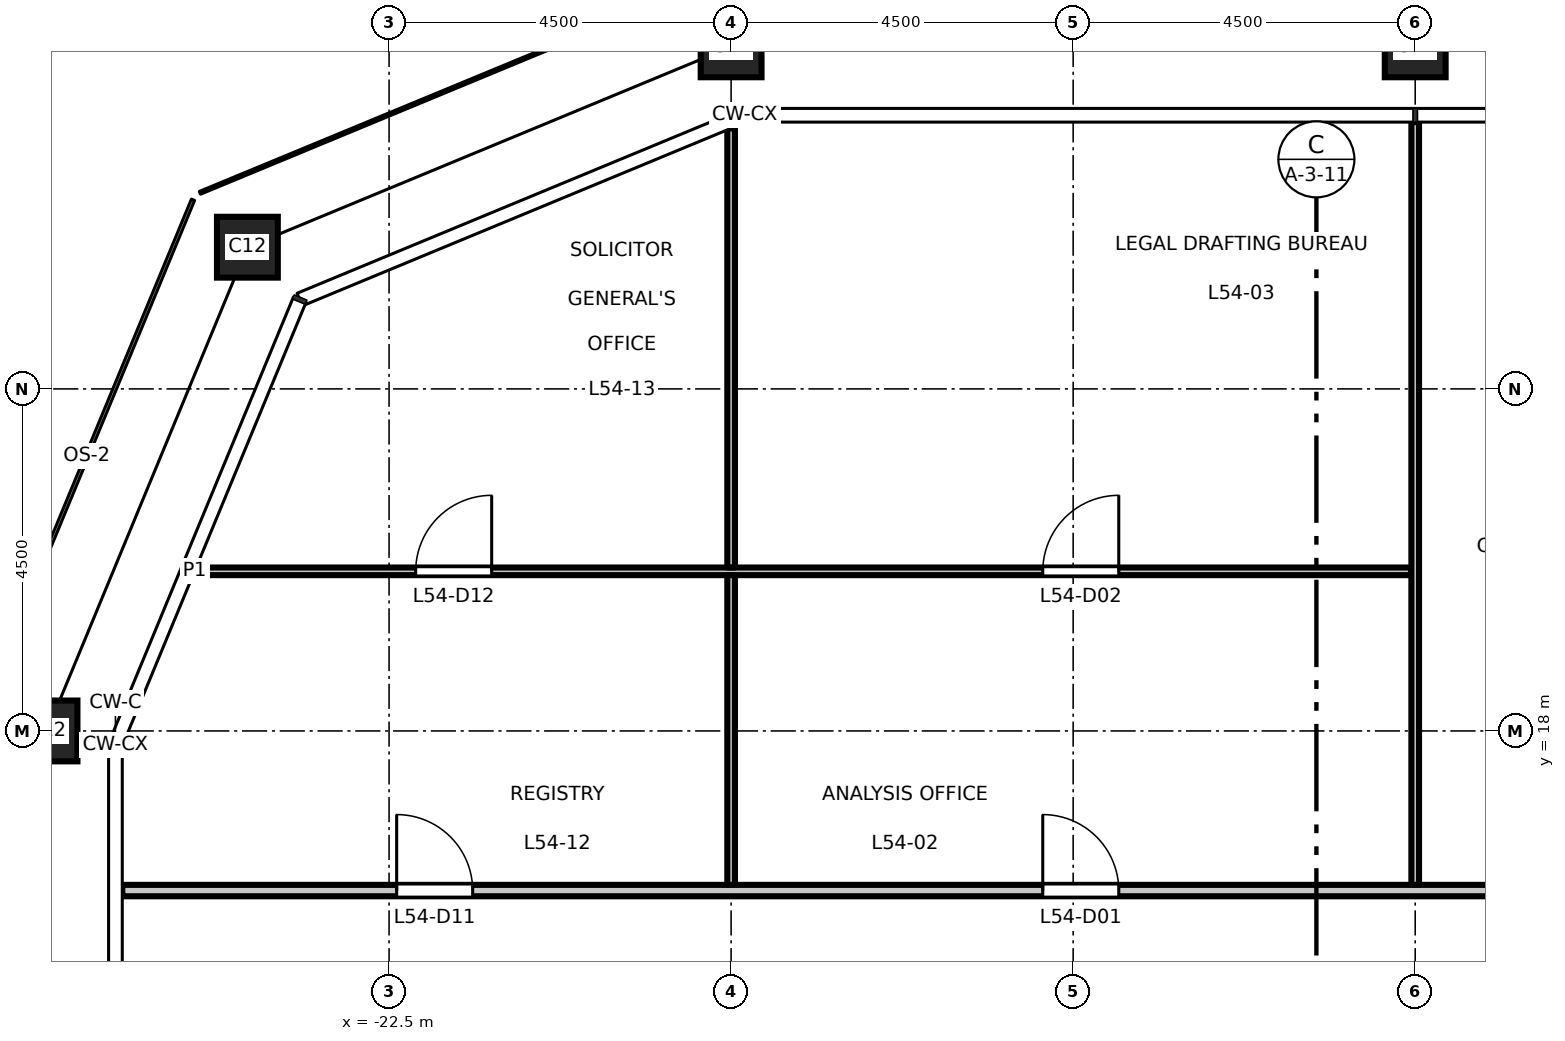
"""IFC4 building model, lengths in metres.
Left out: names, types, materials, properties, quantities, classifications, styles, units other than length and angle.
Written with IfcOpenShell. Run it as: python <this file> out.ifc"""

import sys

from ifc_helpers import new_model, si_unit, direction, frame, frame_2d, origin, origin_2d, place, context, subcontext, project, spatial, rectangle, hollow_rectangle, extrude, element, fill, save


model = new_model("IFC4")
c1 = context("Model", 3, precision=1e-05, world=origin(), true_north=direction((0.0, 1.0)))
c2 = subcontext(c1, "Body", "Model", "MODEL_VIEW")
j1 = project(units=[si_unit("LENGTHUNIT", "METRE"), si_unit("PLANEANGLEUNIT", "RADIAN")], contexts=[c1])
p1 = place(None, origin())
s1 = spatial("IfcSite", under=j1, at=p1, CompositionType="ELEMENT")
p2 = place(p1, origin())
s2 = spatial("IfcBuilding", under=s1, at=p2, CompositionType="ELEMENT")
p3 = place(p2, frame((0.0, 0.0, 251.2)))
s3 = spatial("IfcBuildingStorey", under=s2, at=p3, CompositionType="ELEMENT", Elevation=251.2)
for number, where, z_axis, x_axis in (
    (1, (-9.0, 27.0, 0.0), (0.0, 0.0, 1.0), (1.0, 0.0, 0.0)),
    (2, (-18.0, 27.0, 0.0), (0.0, 0.0, 1.0), (1.0, 0.0, 0.0)),
    (3, (-24.364, 24.364, 0.0), (0.0, 0.0, 1.0), (1.0, 0.0, 0.0)),
    (4, (-27.0, 18.0, 0.0), (0.0, 0.0, 1.0), (1.0, 0.0, 0.0)),
):
    element("IfcColumn", number, at=place(p3, frame(where, z_axis=z_axis, x_axis=x_axis)), inside=s3, PredefinedType="COLUMN", context=c2, shape_type="SweptSolid", body=[
        extrude(hollow_rectangle(XDim=0.8, YDim=0.8, WallThickness=0.045, at=origin_2d()), origin(), (0.0, 0.0, 1.0), 4.5),
    ])
p4 = place(p3, frame((-26.01, 15.9, 0.0), z_axis=(0.0, 0.0, 1.0), x_axis=(1.0, 0.0, 0.0)))
e5 = element("IfcWall", 5, at=p4, inside=s3, PredefinedType="PARTITIONING", context=c2, shape_type="SweptSolid", body=[
    extrude(rectangle(XDim=52.02, YDim=0.15, at=frame_2d((26.01, 0.0))), origin(), (0.0, 0.0, 1.0), 4.35),
])
p5 = place(p4, frame((12.11, 0.0, 0.0)))
e6 = element("IfcOpeningElement", 6, at=p5, cuts=e5, PredefinedType="OPENING", context=c2, shape_type="SweptSolid", body=[
    extrude(rectangle(XDim=1.0, YDim=2.1, at=frame_2d((0.5, 1.05))), frame((0.0, 0.085, 0.0), z_axis=(0.0, -1.0, 0.0), x_axis=(1.0, 0.0, 0.0)), (0.0, 0.0, 1.0), 0.17),
])
p6 = place(p4, frame((21.11, 0.0, 0.0)))
e7 = element("IfcOpeningElement", 7, at=p6, cuts=e5, PredefinedType="OPENING", context=c2, shape_type="SweptSolid", body=[
    extrude(rectangle(XDim=1.0, YDim=2.1, at=frame_2d((0.5, 1.05))), frame((0.0, 0.085, 0.0), z_axis=(0.0, -1.0, 0.0), x_axis=(1.0, 0.0, 0.0)), (0.0, 0.0, 1.0), 0.17),
])
p7 = place(p4, frame((30.11, 0.0, 0.0)))
e8 = element("IfcOpeningElement", 8, at=p7, cuts=e5, PredefinedType="OPENING", context=c2, shape_type="SweptSolid", body=[
    extrude(rectangle(XDim=1.0, YDim=2.1, at=frame_2d((0.5, 1.05))), frame((0.0, 0.085, 0.0), z_axis=(0.0, -1.0, 0.0), x_axis=(1.0, 0.0, 0.0)), (0.0, 0.0, 1.0), 0.17),
])
p8 = place(p4, frame((39.11, 0.0, 0.0)))
e9 = element("IfcOpeningElement", 9, at=p8, cuts=e5, PredefinedType="OPENING", context=c2, shape_type="SweptSolid", body=[
    extrude(rectangle(XDim=1.0, YDim=2.1, at=frame_2d((0.5, 1.05))), frame((0.0, 0.085, 0.0), z_axis=(0.0, -1.0, 0.0), x_axis=(1.0, 0.0, 0.0)), (0.0, 0.0, 1.0), 0.17),
])
p9 = place(p4, frame((3.61, 0.0, 0.0)))
e10 = element("IfcOpeningElement", 10, at=p9, cuts=e5, PredefinedType="OPENING", context=c2, shape_type="SweptSolid", body=[
    extrude(rectangle(XDim=1.0, YDim=2.1, at=frame_2d((0.5, 1.05))), frame((0.0, 0.085, 0.0), z_axis=(0.0, -1.0, 0.0), x_axis=(1.0, 0.0, 0.0)), (0.0, 0.0, 1.0), 0.17),
])
p10 = place(p4, frame((47.62, 0.0, 0.0)))
e11 = element("IfcOpeningElement", 11, at=p10, cuts=e5, PredefinedType="OPENING", context=c2, shape_type="SweptSolid", body=[
    extrude(rectangle(XDim=1.0, YDim=2.1, at=frame_2d((0.5, 1.05))), frame((0.0, 0.085, 0.0), z_axis=(0.0, -1.0, 0.0), x_axis=(1.0, 0.0, 0.0)), (0.0, 0.0, 1.0), 0.17),
])
p11 = place(p3, frame((-25.058, 20.1, 0.0), z_axis=(0.0, 0.0, 1.0), x_axis=(1.0, 0.0, 0.0)))
e12 = element("IfcWall", 12, at=p11, inside=s3, PredefinedType="PARTITIONING", context=c2, shape_type="SweptSolid", body=[
    extrude(rectangle(XDim=16.008, YDim=0.1, at=frame_2d((8.004, 0.0))), origin(), (0.0, 0.0, 1.0), 4.35),
])
p12 = place(p11, frame((11.158, 0.0, 0.0)))
e13 = element("IfcOpeningElement", 13, at=p12, cuts=e12, PredefinedType="OPENING", context=c2, shape_type="SweptSolid", body=[
    extrude(rectangle(XDim=1.0, YDim=2.1, at=frame_2d((0.5, 1.05))), frame((0.0, 0.06, 0.0), z_axis=(0.0, -1.0, 0.0), x_axis=(1.0, 0.0, 0.0)), (0.0, 0.0, 1.0), 0.12),
])
p13 = place(p11, frame((2.908, 0.0, 0.0)))
e14 = element("IfcOpeningElement", 14, at=p13, cuts=e12, PredefinedType="OPENING", context=c2, shape_type="SweptSolid", body=[
    extrude(rectangle(XDim=1.0, YDim=2.1, at=frame_2d((0.5, 1.05))), frame((0.0, 0.06, 0.0), z_axis=(0.0, -1.0, 0.0), x_axis=(1.0, 0.0, 0.0)), (0.0, 0.0, 1.0), 0.12),
])
p14 = place(p3, frame((-18.0, 15.975, 0.0), z_axis=(0.0, 0.0, 1.0), x_axis=(0.0, 1.0, 0.0)))
e15 = element("IfcWall", 15, at=p14, inside=s3, PredefinedType="PARTITIONING", context=c2, shape_type="SweptSolid", body=[
    extrude(rectangle(XDim=4.075, YDim=0.1, at=frame_2d((2.038, 0.0))), origin(), (0.0, 0.0, 1.0), 3.65),
])
p15 = place(p3, frame((-18.0, 20.15, 0.0), z_axis=(0.0, 0.0, 1.0), x_axis=(0.0, 1.0, 0.0)))
e16 = element("IfcWall", 16, at=p15, inside=s3, PredefinedType="PARTITIONING", context=c2, shape_type="SweptSolid", body=[
    extrude(rectangle(XDim=5.778, YDim=0.1, at=frame_2d((2.889, 0.0))), origin(), (0.0, 0.0, 1.0), 3.65),
])
p16 = place(p3, frame((-9.0, 15.975, 0.0), z_axis=(0.0, 0.0, 1.0), x_axis=(0.0, 1.0, 0.0)))
e17 = element("IfcWall", 17, at=p16, inside=s3, PredefinedType="PARTITIONING", context=c2, shape_type="SweptSolid", body=[
    extrude(rectangle(XDim=10.035, YDim=0.1, at=frame_2d((5.018, 0.0))), origin(), (0.0, 0.0, 1.0), 3.65),
])
p17 = place(p5, origin())
e18 = element("IfcDoor", 18, at=p17, inside=s3, OperationType="SINGLE_SWING_LEFT", PredefinedType="DOOR", context=c2, shape_type="SweptSolid", body=[
    extrude(rectangle(XDim=1.0, YDim=2.1, at=frame_2d((0.5, 1.05))), frame((0.0, 0.025, 0.0), z_axis=(0.0, -1.0, 0.0), x_axis=(1.0, 0.0, 0.0)), (0.0, 0.0, 1.0), 0.05),
])
fill(e6, e18)
p18 = place(p12, origin())
e19 = element("IfcDoor", 19, at=p18, inside=s3, OperationType="SINGLE_SWING_RIGHT", PredefinedType="DOOR", context=c2, shape_type="SweptSolid", body=[
    extrude(rectangle(XDim=1.0, YDim=2.1, at=frame_2d((0.5, 1.05))), frame((0.0, 0.025, 0.0), z_axis=(0.0, -1.0, 0.0), x_axis=(1.0, 0.0, 0.0)), (0.0, 0.0, 1.0), 0.05),
])
fill(e13, e19)
p19 = place(p9, origin())
e20 = element("IfcDoor", 20, at=p19, inside=s3, OperationType="SINGLE_SWING_LEFT", PredefinedType="DOOR", context=c2, shape_type="SweptSolid", body=[
    extrude(rectangle(XDim=1.0, YDim=2.1, at=frame_2d((0.5, 1.05))), frame((0.0, 0.025, 0.0), z_axis=(0.0, -1.0, 0.0), x_axis=(1.0, 0.0, 0.0)), (0.0, 0.0, 1.0), 0.05),
])
fill(e10, e20)
p20 = place(p13, origin())
e21 = element("IfcDoor", 21, at=p20, inside=s3, OperationType="SINGLE_SWING_RIGHT", PredefinedType="DOOR", context=c2, shape_type="SweptSolid", body=[
    extrude(rectangle(XDim=1.0, YDim=2.1, at=frame_2d((0.5, 1.05))), frame((0.0, 0.025, 0.0), z_axis=(0.0, -1.0, 0.0), x_axis=(1.0, 0.0, 0.0)), (0.0, 0.0, 1.0), 0.05),
])
fill(e14, e21)
save(model, sys.argv[1])
